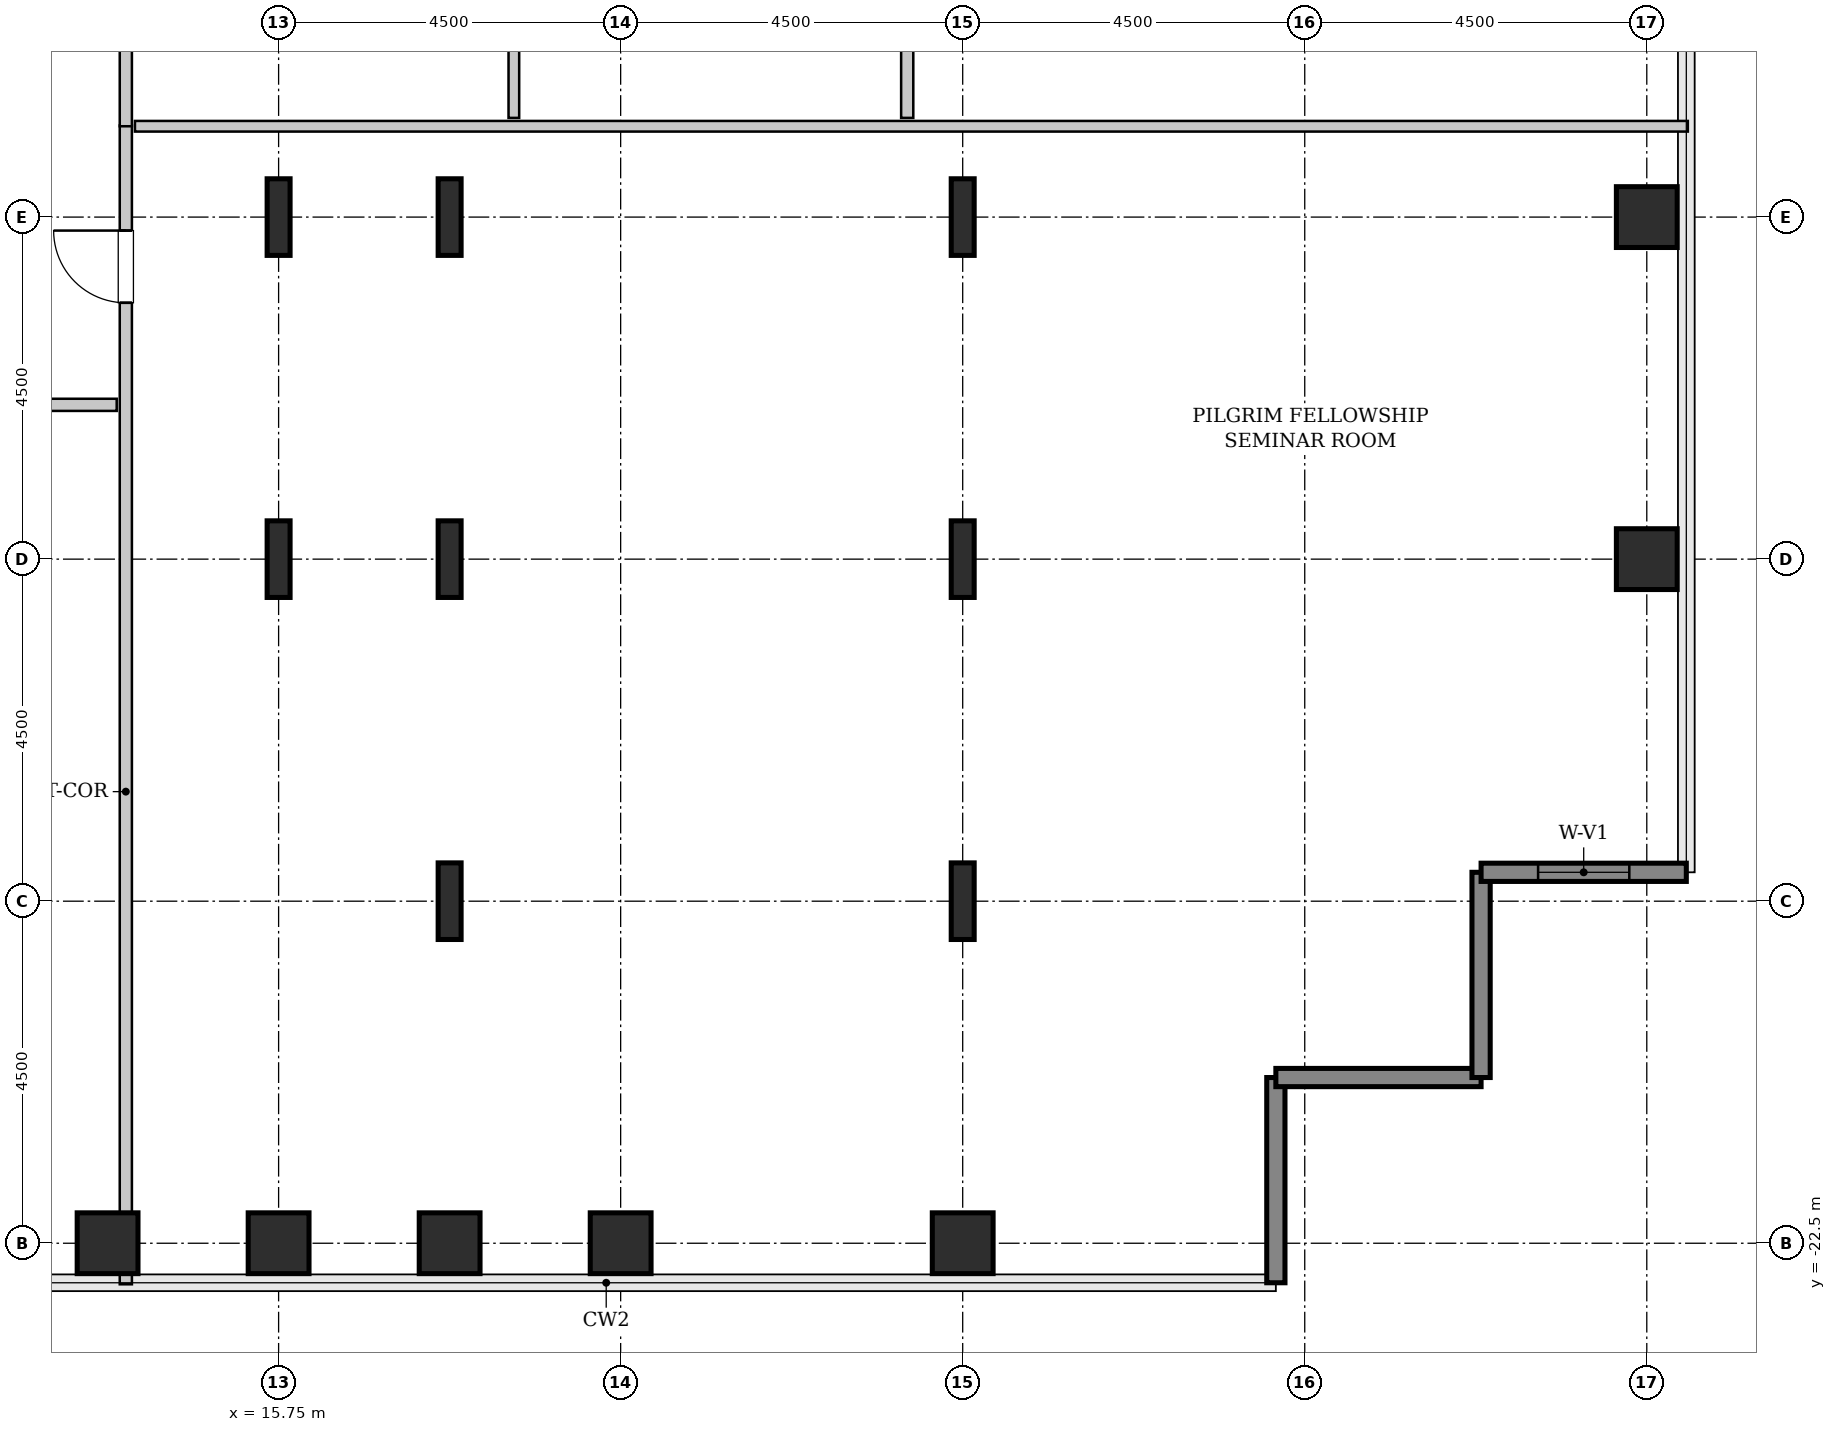
"""IFC4 building model, lengths in metres.
Left out: names, types, materials, properties, quantities, classifications, styles, units other than length and angle.
Written with IfcOpenShell. Run it as: python <this file> out.ifc"""

import sys

from ifc_helpers import new_model, si_unit, direction, frame, frame_2d, origin, origin_2d, place, context, subcontext, project, spatial, rectangle, hollow_rectangle, i_section, extrude, source, transform, mapped, element, fill, save


model = new_model("IFC4")
c1 = context("Model", 3, precision=1e-05, world=origin(), true_north=direction((0.0, 1.0)))
c2 = subcontext(c1, "Body", "Model", "MODEL_VIEW")
j1 = project(units=[si_unit("LENGTHUNIT", "METRE"), si_unit("PLANEANGLEUNIT", "RADIAN")], contexts=[c1])
p1 = place(None, origin())
s1 = spatial("IfcSite", under=j1, at=p1, CompositionType="ELEMENT")
p2 = place(p1, origin())
s2 = spatial("IfcBuilding", under=s1, at=p2, CompositionType="ELEMENT")
p3 = place(p2, frame((0.0, 0.0, 117.4)))
s3 = spatial("IfcBuildingStorey", under=s2, at=p3, CompositionType="ELEMENT", Elevation=117.4)
m1 = source(origin(), c2, "Body", "SweptSolid", [
    extrude(hollow_rectangle(XDim=0.8, YDim=0.8, WallThickness=0.04, InnerFilletRadius=0.04, OuterFilletRadius=0.08, at=origin_2d()), origin(), (0.0, 0.0, 1.0), 3.8),
])
for number, where, z_axis, x_axis in (
    (1, (13.5, -22.5, 0.0), (0.0, 0.0, 1.0), (1.0, 0.0, 0.0)),
    (2, (15.75, -22.5, 0.0), (0.0, 0.0, 1.0), (1.0, 0.0, 0.0)),
):
    element("IfcColumn", number, at=place(p3, frame(where, z_axis=z_axis, x_axis=x_axis)), inside=s3, PredefinedType="COLUMN", context=c2, shape_type="MappedRepresentation", body=[
        mapped(m1, transform((0.0, 0.0, 0.0), x_axis=(1.0, 0.0, 0.0), y_axis=(0.0, 1.0, 0.0), z_axis=(0.0, 0.0, 1.0), scale=1.0)),
    ])
m2 = source(origin(), c2, "Body", "SweptSolid", [
    extrude(i_section(OverallWidth=0.302, OverallDepth=1.008, WebThickness=0.021, FlangeThickness=0.04, FilletRadius=0.03, at=origin_2d()), origin(), (0.0, 0.0, 1.0), 3.8),
])
for number, where, z_axis, x_axis in (
    (3, (15.75, -13.5, 0.0), (0.0, 0.0, 1.0), (1.0, 0.0, 0.0)),
    (4, (15.75, -9.0, 0.0), (0.0, 0.0, 1.0), (1.0, 0.0, 0.0)),
):
    element("IfcColumn", number, at=place(p3, frame(where, z_axis=z_axis, x_axis=x_axis)), inside=s3, PredefinedType="COLUMN", context=c2, shape_type="MappedRepresentation", body=[
        mapped(m2, transform((0.0, 0.0, 0.0), x_axis=(1.0, 0.0, 0.0), y_axis=(0.0, 1.0, 0.0), z_axis=(0.0, 0.0, 1.0), scale=1.0)),
    ])
p4 = place(p3, frame((18.0, -22.5, 0.0), z_axis=(0.0, 0.0, 1.0), x_axis=(1.0, 0.0, 0.0)))
e5 = element("IfcColumn", 5, at=p4, inside=s3, PredefinedType="COLUMN", context=c2, shape_type="MappedRepresentation", body=[
    mapped(m1, transform((0.0, 0.0, 0.0), x_axis=(1.0, 0.0, 0.0), y_axis=(0.0, 1.0, 0.0), z_axis=(0.0, 0.0, 1.0), scale=1.0)),
])
for number, where, z_axis, x_axis in (
    (6, (18.0, -18.0, 0.0), (0.0, 0.0, 1.0), (1.0, 0.0, 0.0)),
    (7, (18.0, -13.5, 0.0), (0.0, 0.0, 1.0), (1.0, 0.0, 0.0)),
    (8, (18.0, -9.0, 0.0), (0.0, 0.0, 1.0), (1.0, 0.0, 0.0)),
):
    element("IfcColumn", number, at=place(p3, frame(where, z_axis=z_axis, x_axis=x_axis)), inside=s3, PredefinedType="COLUMN", context=c2, shape_type="MappedRepresentation", body=[
        mapped(m2, transform((0.0, 0.0, 0.0), x_axis=(1.0, 0.0, 0.0), y_axis=(0.0, 1.0, 0.0), z_axis=(0.0, 0.0, 1.0), scale=1.0)),
    ])
for number, where, z_axis, x_axis in (
    (9, (20.25, -22.5, 0.0), (0.0, 0.0, 1.0), (1.0, 0.0, 0.0)),
    (10, (24.75, -22.5, 0.0), (0.0, 0.0, 1.0), (1.0, 0.0, 0.0)),
):
    element("IfcColumn", number, at=place(p3, frame(where, z_axis=z_axis, x_axis=x_axis)), inside=s3, PredefinedType="COLUMN", context=c2, shape_type="MappedRepresentation", body=[
        mapped(m1, transform((0.0, 0.0, 0.0), x_axis=(1.0, 0.0, 0.0), y_axis=(0.0, 1.0, 0.0), z_axis=(0.0, 0.0, 1.0), scale=1.0)),
    ])
for number, where, z_axis, x_axis in (
    (11, (24.75, -18.0, 0.0), (0.0, 0.0, 1.0), (1.0, 0.0, 0.0)),
    (12, (24.75, -13.5, 0.0), (0.0, 0.0, 1.0), (1.0, 0.0, 0.0)),
    (13, (24.75, -9.0, 0.0), (0.0, 0.0, 1.0), (1.0, 0.0, 0.0)),
):
    element("IfcColumn", number, at=place(p3, frame(where, z_axis=z_axis, x_axis=x_axis)), inside=s3, PredefinedType="COLUMN", context=c2, shape_type="MappedRepresentation", body=[
        mapped(m2, transform((0.0, 0.0, 0.0), x_axis=(1.0, 0.0, 0.0), y_axis=(0.0, 1.0, 0.0), z_axis=(0.0, 0.0, 1.0), scale=1.0)),
    ])
for number, where, z_axis, x_axis in (
    (14, (33.75, -13.5, 0.0), (0.0, 0.0, 1.0), (1.0, 0.0, 0.0)),
    (15, (33.75, -9.0, 0.0), (0.0, 0.0, 1.0), (1.0, 0.0, 0.0)),
):
    element("IfcColumn", number, at=place(p3, frame(where, z_axis=z_axis, x_axis=x_axis)), inside=s3, PredefinedType="COLUMN", context=c2, shape_type="MappedRepresentation", body=[
        mapped(m1, transform((0.0, 0.0, 0.0), x_axis=(1.0, 0.0, 0.0), y_axis=(0.0, 1.0, 0.0), z_axis=(0.0, 0.0, 1.0), scale=1.0)),
    ])
m3 = source(origin(), c2, "Body", "SweptSolid", [
    extrude(rectangle(XDim=2.7, YDim=0.24, at=frame_2d((1.35, 0.0))), origin(), (0.0, 0.0, 1.0), 3.55),
])
for number, where, z_axis, x_axis in (
    (16, (28.87, -23.02, 0.0), (0.0, 0.0, 1.0), (0.0, 1.0, 0.0)),
    (17, (28.87, -20.32, 0.0), (0.0, 0.0, 1.0), (1.0, 0.0, 0.0)),
    (18, (31.57, -20.32, 0.0), (0.0, 0.0, 1.0), (0.0, 1.0, 0.0)),
):
    element("IfcWall", number, at=place(p3, frame(where, z_axis=z_axis, x_axis=x_axis)), inside=s3, PredefinedType="SHEAR", context=c2, shape_type="MappedRepresentation", body=[
        mapped(m3, transform((0.0, 0.0, 0.0), x_axis=(1.0, 0.0, 0.0), y_axis=(0.0, 1.0, 0.0), z_axis=(0.0, 0.0, 1.0), scale=1.0)),
    ])
p5 = place(p3, frame((31.57, -17.62, 0.0), z_axis=(0.0, 0.0, 1.0), x_axis=(1.0, 0.0, 0.0)))
e19 = element("IfcWall", 19, at=p5, inside=s3, PredefinedType="SHEAR", context=c2, shape_type="MappedRepresentation", body=[
    mapped(m3, transform((0.0, 0.0, 0.0), x_axis=(1.0, 0.0, 0.0), y_axis=(0.0, 1.0, 0.0), z_axis=(0.0, 0.0, 1.0), scale=1.0)),
])
p6 = place(p5, frame((0.75, 0.0, 0.85)))
e20 = element("IfcOpeningElement", 20, at=p6, cuts=e19, PredefinedType="OPENING", context=c2, shape_type="SweptSolid", body=[
    extrude(rectangle(XDim=1.2, YDim=1.8, at=frame_2d((0.6, 0.9))), frame((0.0, 0.13, 0.0), z_axis=(0.0, -1.0, 0.0), x_axis=(1.0, 0.0, 0.0)), (0.0, 0.0, 1.0), 0.26),
])
m4 = source(origin(), c2, "Body", "SweptSolid", [
    extrude(rectangle(XDim=15.245, YDim=0.16, at=frame_2d((7.623, 0.0))), origin(), (0.0, 0.0, 1.0), 3.535),
])
p7 = place(p3, frame((13.74, -23.04, 0.0), z_axis=(0.0, 0.0, 1.0), x_axis=(0.0, 1.0, 0.0)))
e21 = element("IfcWall", 21, at=p7, inside=s3, PredefinedType="PARTITIONING", context=c2, shape_type="MappedRepresentation", body=[
    mapped(m4, transform((0.0, 0.0, 0.0), x_axis=(1.0, 0.0, 0.0), y_axis=(0.0, 1.0, 0.0), z_axis=(0.0, 0.0, 1.0), scale=1.0)),
])
p8 = place(p7, frame((12.913, 0.0, 0.0)))
e22 = element("IfcOpeningElement", 22, at=p8, cuts=e21, PredefinedType="OPENING", context=c2, shape_type="SweptSolid", body=[
    extrude(rectangle(XDim=0.95, YDim=2.1, at=frame_2d((0.475, 1.05))), frame((0.0, 0.09, 0.0), z_axis=(0.0, -1.0, 0.0), x_axis=(1.0, 0.0, 0.0)), (0.0, 0.0, 1.0), 0.18),
])
m5 = source(origin(), c2, "Body", "SweptSolid", [
    extrude(rectangle(XDim=20.43, YDim=0.14, at=frame_2d((10.215, 0.0))), origin(), (0.0, 0.0, 1.0), 3.535),
])
p9 = place(p3, frame((13.86, -7.805, 0.0), z_axis=(0.0, 0.0, 1.0), x_axis=(1.0, 0.0, 0.0)))
e23 = element("IfcWall", 23, at=p9, inside=s3, PredefinedType="PARTITIONING", context=c2, shape_type="MappedRepresentation", body=[
    mapped(m5, transform((0.0, 0.0, 0.0), x_axis=(1.0, 0.0, 0.0), y_axis=(0.0, 1.0, 0.0), z_axis=(0.0, 0.0, 1.0), scale=1.0)),
])
m6 = source(origin(), c2, "Body", "SweptSolid", [
    extrude(rectangle(XDim=15.5, YDim=0.16, at=frame_2d((7.75, 0.0))), origin(), (0.0, 0.0, 1.0), 3.535),
])
p10 = place(p3, frame((24.02, -7.695, 0.0), z_axis=(0.0, 0.0, 1.0), x_axis=(0.0, 1.0, 0.0)))
e24 = element("IfcWall", 24, at=p10, inside=s3, PredefinedType="PARTITIONING", context=c2, shape_type="MappedRepresentation", body=[
    mapped(m6, transform((0.0, 0.0, 0.0), x_axis=(1.0, 0.0, 0.0), y_axis=(0.0, 1.0, 0.0), z_axis=(0.0, 0.0, 1.0), scale=1.0)),
])
p11 = place(p10, frame((9.47, 0.0, 0.0)))
e25 = element("IfcOpeningElement", 25, at=p11, cuts=e24, PredefinedType="OPENING", context=c2, shape_type="SweptSolid", body=[
    extrude(rectangle(XDim=0.95, YDim=2.1, at=frame_2d((0.475, 1.05))), frame((0.0, 0.09, 0.0), z_axis=(0.0, -1.0, 0.0), x_axis=(1.0, 0.0, 0.0)), (0.0, 0.0, 1.0), 0.18),
])
m7 = source(origin(), c2, "Body", "SweptSolid", [
    extrude(rectangle(XDim=9.195, YDim=0.16, at=frame_2d((4.597, 0.0))), origin(), (0.0, 0.0, 1.0), 3.535),
])
p12 = place(p3, frame((13.74, -7.805, 0.0), z_axis=(0.0, 0.0, 1.0), x_axis=(0.0, 1.0, 0.0)))
e26 = element("IfcWall", 26, at=p12, inside=s3, PredefinedType="PARTITIONING", context=c2, shape_type="MappedRepresentation", body=[
    mapped(m7, transform((0.0, 0.0, 0.0), x_axis=(1.0, 0.0, 0.0), y_axis=(0.0, 1.0, 0.0), z_axis=(0.0, 0.0, 1.0), scale=1.0)),
])
p13 = place(p12, frame((4.123, 0.0, 0.0)))
e27 = element("IfcOpeningElement", 27, at=p13, cuts=e26, PredefinedType="OPENING", context=c2, shape_type="SweptSolid", body=[
    extrude(rectangle(XDim=0.95, YDim=2.1, at=frame_2d((0.475, 1.05))), frame((0.0, 0.09, 0.0), z_axis=(0.0, -1.0, 0.0), x_axis=(1.0, 0.0, 0.0)), (0.0, 0.0, 1.0), 0.18),
])
m8 = source(origin(), c2, "Body", "SweptSolid", [
    extrude(rectangle(XDim=8.965, YDim=0.14, at=frame_2d((4.482, 0.0))), origin(), (0.0, 0.0, 1.0), 3.535),
])
p14 = place(p3, frame((18.845, -7.695, 0.0), z_axis=(0.0, 0.0, 1.0), x_axis=(0.0, 1.0, 0.0)))
e28 = element("IfcWall", 28, at=p14, inside=s3, PredefinedType="PARTITIONING", context=c2, shape_type="MappedRepresentation", body=[
    mapped(m8, transform((0.0, 0.0, 0.0), x_axis=(1.0, 0.0, 0.0), y_axis=(0.0, 1.0, 0.0), z_axis=(0.0, 0.0, 1.0), scale=1.0)),
])
m9 = source(origin(), c2, "Body", "SweptSolid", [
    extrude(rectangle(XDim=5.225, YDim=0.16, at=frame_2d((2.613, 0.0))), origin(), (0.0, 0.0, 1.0), 3.535),
])
p15 = place(p3, frame((8.395, -11.47, 0.0), z_axis=(0.0, 0.0, 1.0), x_axis=(1.0, 0.0, 0.0)))
e29 = element("IfcWall", 29, at=p15, inside=s3, PredefinedType="PARTITIONING", context=c2, shape_type="MappedRepresentation", body=[
    mapped(m9, transform((0.0, 0.0, 0.0), x_axis=(1.0, 0.0, 0.0), y_axis=(0.0, 1.0, 0.0), z_axis=(0.0, 0.0, 1.0), scale=1.0)),
])
p16 = place(p15, frame((2.137, 0.0, 0.0)))
e30 = element("IfcOpeningElement", 30, at=p16, cuts=e29, PredefinedType="OPENING", context=c2, shape_type="SweptSolid", body=[
    extrude(rectangle(XDim=0.95, YDim=2.1, at=frame_2d((0.475, 1.05))), frame((0.0, 0.09, 0.0), z_axis=(0.0, -1.0, 0.0), x_axis=(1.0, 0.0, 0.0)), (0.0, 0.0, 1.0), 0.18),
])
m10 = source(origin(), c2, "Body", "SweptSolid", [
    extrude(rectangle(XDim=1.2, YDim=1.8, at=frame_2d((0.6, 0.9))), frame((0.0, 0.03, 0.0), z_axis=(0.0, -1.0, 0.0), x_axis=(1.0, 0.0, 0.0)), (0.0, 0.0, 1.0), 0.06),
])
p17 = place(p6, origin())
e31 = element("IfcWindow", 31, at=p17, inside=s3, PartitioningType="SINGLE_PANEL", PredefinedType="WINDOW", context=c2, shape_type="MappedRepresentation", body=[
    mapped(m10, transform((0.0, 0.0, 0.0), x_axis=(1.0, 0.0, 0.0), y_axis=(0.0, 1.0, 0.0), z_axis=(0.0, 0.0, 1.0), scale=1.0)),
])
fill(e20, e31)
m11 = source(origin(), c2, "Body", "SweptSolid", [
    extrude(rectangle(XDim=0.95, YDim=2.1, at=frame_2d((0.475, 1.05))), frame((0.0, 0.025, 0.0), z_axis=(0.0, -1.0, 0.0), x_axis=(1.0, 0.0, 0.0)), (0.0, 0.0, 1.0), 0.05),
])
p18 = place(p8, origin())
e32 = element("IfcDoor", 32, at=p18, inside=s3, OperationType="SINGLE_SWING_RIGHT", PredefinedType="DOOR", context=c2, shape_type="MappedRepresentation", body=[
    mapped(m11, transform((0.0, 0.0, 0.0), x_axis=(1.0, 0.0, 0.0), y_axis=(0.0, 1.0, 0.0), z_axis=(0.0, 0.0, 1.0), scale=1.0)),
])
fill(e22, e32)
save(model, sys.argv[1])
